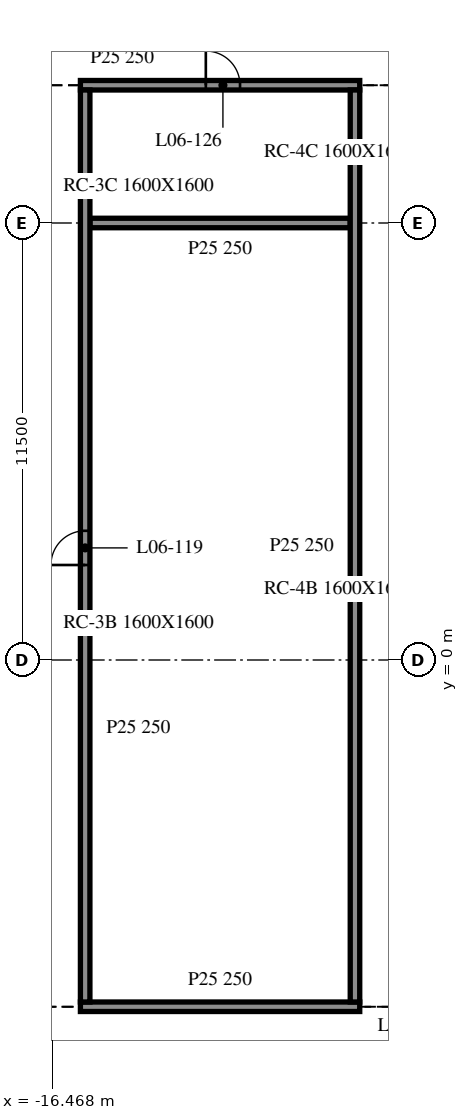
"""IFC4 building model, lengths in metres.
Left out: names, types, materials, properties, quantities, classifications, styles, units other than length and angle.
Written with IfcOpenShell. Run it as: python <this file> out.ifc"""

import sys

from ifc_helpers import new_model, si_unit, direction, frame, frame_2d, origin, place, context, subcontext, project, spatial, rectangle, extrude, element, fill, save


model = new_model("IFC4")
c1 = context("Model", 3, precision=1e-05, world=origin(), true_north=direction((0.0, 1.0)))
c2 = subcontext(c1, "Body", "Model", "MODEL_VIEW")
j1 = project(units=[si_unit("LENGTHUNIT", "METRE"), si_unit("PLANEANGLEUNIT", "RADIAN")], contexts=[c1])
p1 = place(None, origin())
s1 = spatial("IfcSite", under=j1, at=p1, CompositionType="ELEMENT")
p2 = place(p1, origin())
s2 = spatial("IfcBuilding", under=s1, at=p2, CompositionType="ELEMENT")
p3 = place(p2, frame((0.0, 0.0, 28.7)))
s3 = spatial("IfcBuildingStorey", under=s2, at=p3, CompositionType="ELEMENT", Elevation=28.7)
p4 = place(p3, frame((-15.725, -9.125, 0.0), z_axis=(0.0, 0.0, 1.0), x_axis=(1.0, 0.0, 0.0)))
e1 = element("IfcWall", 1, at=p4, inside=s3, PredefinedType="PARTITIONING", context=c2, shape_type="SweptSolid", body=[
    extrude(rectangle(XDim=7.35, YDim=0.25, at=frame_2d((3.675, 0.0))), origin(), (0.0, 0.0, 1.0), 3.96),
])
p5 = place(p3, frame((-15.475, 11.5, 0.0), z_axis=(0.0, 0.0, 1.0), x_axis=(1.0, 0.0, 0.0)))
e2 = element("IfcWall", 2, at=p5, inside=s3, PredefinedType="PARTITIONING", context=c2, shape_type="SweptSolid", body=[
    extrude(rectangle(XDim=6.85, YDim=0.25, at=frame_2d((3.425, 0.0))), origin(), (0.0, 0.0, 1.0), 3.96),
])
p6 = place(p3, frame((-15.725, 15.125, 0.0), z_axis=(0.0, 0.0, 1.0), x_axis=(1.0, 0.0, 0.0)))
e3 = element("IfcWall", 3, at=p6, inside=s3, PredefinedType="PARTITIONING", context=c2, shape_type="SweptSolid", body=[
    extrude(rectangle(XDim=7.35, YDim=0.25, at=frame_2d((3.675, 0.0))), origin(), (0.0, 0.0, 1.0), 3.96),
])
p7 = place(p6, frame((3.3, 0.0, 0.0)))
e4 = element("IfcOpeningElement", 4, at=p7, cuts=e3, PredefinedType="OPENING", context=c2, shape_type="SweptSolid", body=[
    extrude(rectangle(XDim=0.9, YDim=2.1, at=frame_2d((0.45, 1.05))), frame((0.0, 0.135, 0.0), z_axis=(0.0, -1.0, 0.0), x_axis=(1.0, 0.0, 0.0)), (0.0, 0.0, 1.0), 0.27),
])
p8 = place(p3, frame((-15.6, -9.0, 0.0), z_axis=(0.0, 0.0, 1.0), x_axis=(0.0, 1.0, 0.0)))
e5 = element("IfcWall", 5, at=p8, inside=s3, PredefinedType="PARTITIONING", context=c2, shape_type="SweptSolid", body=[
    extrude(rectangle(XDim=24.0, YDim=0.25, at=frame_2d((12.0, 0.0))), origin(), (0.0, 0.0, 1.0), 3.96),
])
p9 = place(p8, frame((11.5, 0.0, 0.0)))
e6 = element("IfcOpeningElement", 6, at=p9, cuts=e5, PredefinedType="OPENING", context=c2, shape_type="SweptSolid", body=[
    extrude(rectangle(XDim=0.9, YDim=2.1, at=frame_2d((0.45, 1.05))), frame((0.0, 0.135, 0.0), z_axis=(0.0, -1.0, 0.0), x_axis=(1.0, 0.0, 0.0)), (0.0, 0.0, 1.0), 0.27),
])
p10 = place(p3, frame((-8.5, -9.0, 0.0), z_axis=(0.0, 0.0, 1.0), x_axis=(0.0, 1.0, 0.0)))
e7 = element("IfcWall", 7, at=p10, inside=s3, PredefinedType="PARTITIONING", context=c2, shape_type="SweptSolid", body=[
    extrude(rectangle(XDim=24.0, YDim=0.25, at=frame_2d((12.0, 0.0))), origin(), (0.0, 0.0, 1.0), 3.96),
])
p11 = place(p9, origin())
e8 = element("IfcDoor", 8, at=p11, inside=s3, OperationType="SINGLE_SWING_RIGHT", PredefinedType="DOOR", context=c2, shape_type="SweptSolid", body=[
    extrude(rectangle(XDim=0.9, YDim=2.1, at=frame_2d((0.45, 1.05))), frame((0.0, 0.025, 0.0), z_axis=(0.0, -1.0, 0.0), x_axis=(1.0, 0.0, 0.0)), (0.0, 0.0, 1.0), 0.05),
])
fill(e6, e8)
p12 = place(p7, origin())
e9 = element("IfcDoor", 9, at=p12, inside=s3, OperationType="SINGLE_SWING_LEFT", PredefinedType="DOOR", context=c2, shape_type="SweptSolid", body=[
    extrude(rectangle(XDim=0.9, YDim=2.1, at=frame_2d((0.45, 1.05))), frame((0.0, 0.025, 0.0), z_axis=(0.0, -1.0, 0.0), x_axis=(1.0, 0.0, 0.0)), (0.0, 0.0, 1.0), 0.05),
])
fill(e4, e9)
save(model, sys.argv[1])
